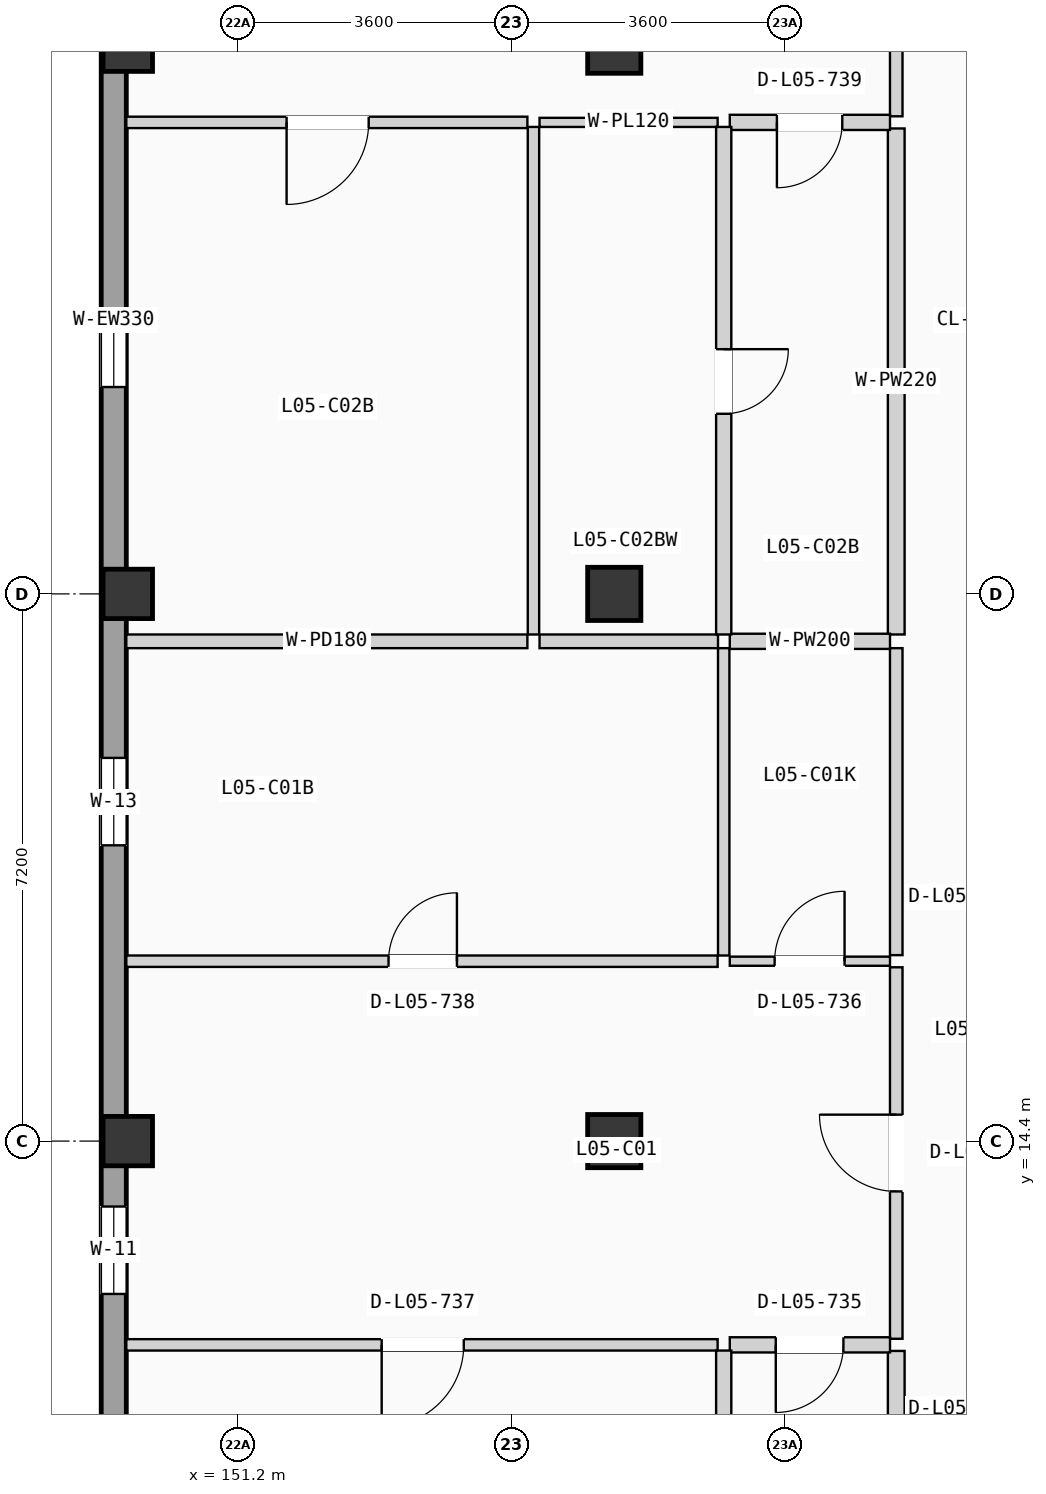
"""IFC4 building model, lengths in metres.
Left out: names, types, materials, properties, quantities, classifications, styles, units other than length and angle.
Written with IfcOpenShell. Run it as: python <this file> out.ifc"""

import sys

from ifc_helpers import new_model, si_unit, direction, frame, frame_2d, origin, origin_2d, place, context, subcontext, project, spatial, rectangle, extrude, element, fill, save


model = new_model("IFC4")
c1 = context("Model", 3, precision=1e-05, world=origin(), true_north=direction((0.0, 1.0)))
c2 = subcontext(c1, "Body", "Model", "MODEL_VIEW")
j1 = project(units=[si_unit("LENGTHUNIT", "METRE"), si_unit("PLANEANGLEUNIT", "RADIAN")], contexts=[c1])
p1 = place(None, origin())
s1 = spatial("IfcSite", under=j1, at=p1, CompositionType="ELEMENT")
p2 = place(p1, origin())
s2 = spatial("IfcBuilding", under=s1, at=p2, CompositionType="ELEMENT")
p3 = place(p2, frame((0.0, 0.0, 18.375)))
s3 = spatial("IfcBuildingStorey", under=s2, at=p3, CompositionType="ELEMENT", Elevation=18.375)
for number, where, z_axis, x_axis in (
    (1, (149.75, 14.4, 0.0), (0.0, 0.0, 1.0), (1.0, 0.0, 0.0)),
    (2, (149.75, 21.6, 0.0), (0.0, 0.0, 1.0), (1.0, 0.0, 0.0)),
    (3, (149.75, 28.8, 0.0), (0.0, 0.0, 1.0), (1.0, 0.0, 0.0)),
):
    element("IfcColumn", number, at=place(p3, frame(where, z_axis=z_axis, x_axis=x_axis)), inside=s3, PredefinedType="COLUMN", context=c2, shape_type="SweptSolid", body=[
        extrude(rectangle(XDim=0.65, YDim=0.65, at=origin_2d()), origin(), (0.0, 0.0, 1.0), 3.15),
    ])
for number, where, z_axis, x_axis in (
    (4, (156.15, 14.4, 0.0), (0.0, 0.0, 1.0), (1.0, 0.0, 0.0)),
    (5, (156.15, 21.6, 0.0), (0.0, 0.0, 1.0), (1.0, 0.0, 0.0)),
    (6, (156.15, 28.8, 0.0), (0.0, 0.0, 1.0), (1.0, 0.0, 0.0)),
):
    element("IfcColumn", number, at=place(p3, frame(where, z_axis=z_axis, x_axis=x_axis)), inside=s3, PredefinedType="COLUMN", context=c2, shape_type="SweptSolid", body=[
        extrude(rectangle(XDim=0.7, YDim=0.7, at=origin_2d()), origin(), (0.0, 0.0, 1.0), 3.15),
    ])
p4 = place(p3, frame((149.565, 0.33, 0.0), z_axis=(0.0, 0.0, 1.0), x_axis=(0.0, 1.0, 0.0)))
e7 = element("IfcWall", 7, at=p4, inside=s3, PredefinedType="SOLIDWALL", context=c2, shape_type="SweptSolid", body=[
    extrude(rectangle(XDim=49.74, YDim=0.33, at=frame_2d((24.87, 0.0))), origin(), (0.0, 0.0, 1.0), 2.89),
])
p5 = place(p4, frame((12.059, 0.0, 0.9)))
e8 = element("IfcOpeningElement", 8, at=p5, cuts=e7, PredefinedType="OPENING", context=c2, shape_type="SweptSolid", body=[
    extrude(rectangle(XDim=1.15, YDim=1.2, at=frame_2d((0.575, 0.6))), frame((0.0, 0.175, 0.0), z_axis=(0.0, -1.0, 0.0), x_axis=(1.0, 0.0, 0.0)), (0.0, 0.0, 1.0), 0.35),
])
p6 = place(p4, frame((8.714, 0.0, 0.855)))
e9 = element("IfcOpeningElement", 9, at=p6, cuts=e7, PredefinedType="OPENING", context=c2, shape_type="SweptSolid", body=[
    extrude(rectangle(XDim=1.15, YDim=1.35, at=frame_2d((0.575, 0.675))), frame((0.0, 0.175, 0.0), z_axis=(0.0, -1.0, 0.0), x_axis=(1.0, 0.0, 0.0)), (0.0, 0.0, 1.0), 0.35),
])
p7 = place(p4, frame((17.962, 0.0, 0.705)))
e10 = element("IfcOpeningElement", 10, at=p7, cuts=e7, PredefinedType="OPENING", context=c2, shape_type="SweptSolid", body=[
    extrude(rectangle(XDim=1.15, YDim=1.5, at=frame_2d((0.575, 0.75))), frame((0.0, 0.175, 0.0), z_axis=(0.0, -1.0, 0.0), x_axis=(1.0, 0.0, 0.0)), (0.0, 0.0, 1.0), 0.35),
])
p8 = place(p4, frame((31.115, 0.0, 0.555)))
e11 = element("IfcOpeningElement", 11, at=p8, cuts=e7, PredefinedType="OPENING", context=c2, shape_type="SweptSolid", body=[
    extrude(rectangle(XDim=1.15, YDim=1.65, at=frame_2d((0.575, 0.825))), frame((0.0, 0.175, 0.0), z_axis=(0.0, -1.0, 0.0), x_axis=(1.0, 0.0, 0.0)), (0.0, 0.0, 1.0), 0.35),
])
p9 = place(p4, frame((23.992, 0.0, 0.85)))
e12 = element("IfcOpeningElement", 12, at=p9, cuts=e7, PredefinedType="OPENING", context=c2, shape_type="SweptSolid", body=[
    extrude(rectangle(XDim=0.95, YDim=1.2, at=frame_2d((0.475, 0.6))), frame((0.0, 0.175, 0.0), z_axis=(0.0, -1.0, 0.0), x_axis=(1.0, 0.0, 0.0)), (0.0, 0.0, 1.0), 0.35),
])
p10 = place(p4, frame((38.58, 0.0, 0.9)))
e13 = element("IfcOpeningElement", 13, at=p10, cuts=e7, PredefinedType="OPENING", context=c2, shape_type="SweptSolid", body=[
    extrude(rectangle(XDim=1.25, YDim=1.2, at=frame_2d((0.625, 0.6))), frame((0.0, 0.175, 0.0), z_axis=(0.0, -1.0, 0.0), x_axis=(1.0, 0.0, 0.0)), (0.0, 0.0, 1.0), 0.35),
])
p11 = place(p3, frame((159.86, 11.799, 0.0), z_axis=(0.0, 0.0, 1.0), x_axis=(0.0, 1.0, 0.0)))
e14 = element("IfcWall", 14, at=p11, inside=s3, PredefinedType="PARTITIONING", context=c2, shape_type="SweptSolid", body=[
    extrude(rectangle(XDim=4.888, YDim=0.165, at=frame_2d((2.444, 0.0))), origin(), (0.0, 0.0, 1.0), 2.87),
])
p12 = place(p11, frame((1.939, 0.0, 0.0)))
e15 = element("IfcOpeningElement", 15, at=p12, cuts=e14, PredefinedType="OPENING", context=c2, shape_type="SweptSolid", body=[
    extrude(rectangle(XDim=1.01, YDim=2.11, at=frame_2d((0.505, 1.055))), frame((0.0, 0.093, 0.0), z_axis=(0.0, -1.0, 0.0), x_axis=(1.0, 0.0, 0.0)), (0.0, 0.0, 1.0), 0.185),
])
p13 = place(p3, frame((159.86, 7.6, 0.0), z_axis=(0.0, 0.0, 1.0), x_axis=(0.0, 1.0, 0.0)))
e16 = element("IfcWall", 16, at=p13, inside=s3, PredefinedType="PLUMBINGWALL", context=c2, shape_type="SweptSolid", body=[
    extrude(rectangle(XDim=4.039, YDim=0.22, at=frame_2d((2.02, 0.0))), origin(), (0.0, 0.0, 1.0), 2.87),
])
p14 = place(p3, frame((159.86, 16.847, 0.0), z_axis=(0.0, 0.0, 1.0), x_axis=(0.0, 1.0, 0.0)))
e17 = element("IfcWall", 17, at=p14, inside=s3, PredefinedType="PARTITIONING", context=c2, shape_type="SweptSolid", body=[
    extrude(rectangle(XDim=4.039, YDim=0.165, at=frame_2d((2.02, 0.0))), origin(), (0.0, 0.0, 1.0), 2.87),
])
p15 = place(p3, frame((159.86, 27.884, 0.0), z_axis=(0.0, 0.0, 1.0), x_axis=(0.0, 1.0, 0.0)))
e18 = element("IfcWall", 18, at=p15, inside=s3, PredefinedType="PARTITIONING", context=c2, shape_type="SweptSolid", body=[
    extrude(rectangle(XDim=7.086, YDim=0.165, at=frame_2d((3.543, 0.0))), origin(), (0.0, 0.0, 1.0), 2.87),
])
p16 = place(p15, frame((3.038, 0.0, 0.0)))
e19 = element("IfcOpeningElement", 19, at=p16, cuts=e18, PredefinedType="OPENING", context=c2, shape_type="SweptSolid", body=[
    extrude(rectangle(XDim=1.01, YDim=2.11, at=frame_2d((0.505, 1.055))), frame((0.0, 0.093, 0.0), z_axis=(0.0, -1.0, 0.0), x_axis=(1.0, 0.0, 0.0)), (0.0, 0.0, 1.0), 0.185),
])
p17 = place(p3, frame((159.86, 21.066, 0.0), z_axis=(0.0, 0.0, 1.0), x_axis=(0.0, 1.0, 0.0)))
e20 = element("IfcWall", 20, at=p17, inside=s3, PredefinedType="PLUMBINGWALL", context=c2, shape_type="SweptSolid", body=[
    extrude(rectangle(XDim=6.658, YDim=0.22, at=frame_2d((3.329, 0.0))), origin(), (0.0, 0.0, 1.0), 2.87),
])
p18 = place(p3, frame((157.67, 11.719, 0.0), z_axis=(0.0, 0.0, 1.0), x_axis=(1.0, 0.0, 0.0)))
e21 = element("IfcWall", 21, at=p18, inside=s3, PredefinedType="PLUMBINGWALL", context=c2, shape_type="SweptSolid", body=[
    extrude(rectangle(XDim=2.108, YDim=0.2, at=frame_2d((1.054, 0.0))), origin(), (0.0, 0.0, 1.0), 2.87),
])
p19 = place(p18, frame((0.605, 0.0, 0.0)))
e22 = element("IfcOpeningElement", 22, at=p19, cuts=e21, PredefinedType="OPENING", context=c2, shape_type="SweptSolid", body=[
    extrude(rectangle(XDim=0.89, YDim=2.03, at=frame_2d((0.445, 1.015))), frame((0.0, 0.11, 0.0), z_axis=(0.0, -1.0, 0.0), x_axis=(1.0, 0.0, 0.0)), (0.0, 0.0, 1.0), 0.22),
])
p20 = place(p3, frame((157.67, 16.767, 0.0), z_axis=(0.0, 0.0, 1.0), x_axis=(1.0, 0.0, 0.0)))
e23 = element("IfcWall", 23, at=p20, inside=s3, PredefinedType="PARTITIONING", context=c2, shape_type="SweptSolid", body=[
    extrude(rectangle(XDim=2.108, YDim=0.12, at=frame_2d((1.054, 0.0))), origin(), (0.0, 0.0, 1.0), 2.87),
])
p21 = place(p20, frame((0.59, 0.0, 0.0)))
e24 = element("IfcOpeningElement", 24, at=p21, cuts=e23, PredefinedType="OPENING", context=c2, shape_type="SweptSolid", body=[
    extrude(rectangle(XDim=0.92, YDim=2.02, at=frame_2d((0.46, 1.01))), frame((0.0, 0.07, 0.0), z_axis=(0.0, -1.0, 0.0), x_axis=(1.0, 0.0, 0.0)), (0.0, 0.0, 1.0), 0.14),
])
p22 = place(p3, frame((149.73, 11.719, 0.0), z_axis=(0.0, 0.0, 1.0), x_axis=(1.0, 0.0, 0.0)))
e25 = element("IfcWall", 25, at=p22, inside=s3, PredefinedType="PARTITIONING", context=c2, shape_type="SweptSolid", body=[
    extrude(rectangle(XDim=7.78, YDim=0.15, at=frame_2d((3.89, 0.0))), origin(), (0.0, 0.0, 1.0), 2.87),
])
p23 = place(p22, frame((3.36, 0.0, 0.0)))
e26 = element("IfcOpeningElement", 26, at=p23, cuts=e25, PredefinedType="OPENING", context=c2, shape_type="SweptSolid", body=[
    extrude(rectangle(XDim=1.08, YDim=2.1, at=frame_2d((0.54, 1.05))), frame((0.0, 0.085, 0.0), z_axis=(0.0, -1.0, 0.0), x_axis=(1.0, 0.0, 0.0)), (0.0, 0.0, 1.0), 0.17),
])
p24 = place(p3, frame((149.73, 16.767, 0.0), z_axis=(0.0, 0.0, 1.0), x_axis=(1.0, 0.0, 0.0)))
e27 = element("IfcWall", 27, at=p24, inside=s3, PredefinedType="PARTITIONING", context=c2, shape_type="SweptSolid", body=[
    extrude(rectangle(XDim=7.78, YDim=0.15, at=frame_2d((3.89, 0.0))), origin(), (0.0, 0.0, 1.0), 2.87),
])
p25 = place(p24, frame((3.45, 0.0, 0.0)))
e28 = element("IfcOpeningElement", 28, at=p25, cuts=e27, PredefinedType="OPENING", context=c2, shape_type="SweptSolid", body=[
    extrude(rectangle(XDim=0.9, YDim=2.04, at=frame_2d((0.45, 1.02))), frame((0.0, 0.085, 0.0), z_axis=(0.0, -1.0, 0.0), x_axis=(1.0, 0.0, 0.0)), (0.0, 0.0, 1.0), 0.17),
])
p26 = place(p3, frame((157.59, 7.6, 0.0), z_axis=(0.0, 0.0, 1.0), x_axis=(0.0, 1.0, 0.0)))
e29 = element("IfcWall", 29, at=p26, inside=s3, PredefinedType="PLUMBINGWALL", context=c2, shape_type="SweptSolid", body=[
    extrude(rectangle(XDim=4.044, YDim=0.2, at=frame_2d((2.022, 0.0))), origin(), (0.0, 0.0, 1.0), 2.87),
])
p27 = place(p3, frame((157.59, 16.842, 0.0), z_axis=(0.0, 0.0, 1.0), x_axis=(0.0, 1.0, 0.0)))
e30 = element("IfcWall", 30, at=p27, inside=s3, PredefinedType="PARTITIONING", context=c2, shape_type="SweptSolid", body=[
    extrude(rectangle(XDim=4.044, YDim=0.15, at=frame_2d((2.022, 0.0))), origin(), (0.0, 0.0, 1.0), 2.87),
])
p28 = place(p3, frame((157.67, 20.976, 0.0), z_axis=(0.0, 0.0, 1.0), x_axis=(1.0, 0.0, 0.0)))
e31 = element("IfcWall", 31, at=p28, inside=s3, PredefinedType="PLUMBINGWALL", context=c2, shape_type="SweptSolid", body=[
    extrude(rectangle(XDim=2.108, YDim=0.2, at=frame_2d((1.054, 0.0))), origin(), (0.0, 0.0, 1.0), 2.87),
])
p29 = place(p3, frame((149.73, 20.976, 0.0), z_axis=(0.0, 0.0, 1.0), x_axis=(1.0, 0.0, 0.0)))
e32 = element("IfcWall", 32, at=p29, inside=s3, PredefinedType="PARTITIONING", context=c2, shape_type="SweptSolid", body=[
    extrude(rectangle(XDim=5.277, YDim=0.18, at=frame_2d((2.639, 0.0))), origin(), (0.0, 0.0, 1.0), 2.87),
])
p30 = place(p3, frame((155.167, 20.976, 0.0), z_axis=(0.0, 0.0, 1.0), x_axis=(1.0, 0.0, 0.0)))
e33 = element("IfcWall", 33, at=p30, inside=s3, PredefinedType="PARTITIONING", context=c2, shape_type="SweptSolid", body=[
    extrude(rectangle(XDim=2.348, YDim=0.18, at=frame_2d((1.174, 0.0))), origin(), (0.0, 0.0, 1.0), 2.87),
])
p31 = place(p3, frame((157.67, 27.804, 0.0), z_axis=(0.0, 0.0, 1.0), x_axis=(1.0, 0.0, 0.0)))
e34 = element("IfcWall", 34, at=p31, inside=s3, PredefinedType="PLUMBINGWALL", context=c2, shape_type="SweptSolid", body=[
    extrude(rectangle(XDim=2.108, YDim=0.2, at=frame_2d((1.054, 0.0))), origin(), (0.0, 0.0, 1.0), 2.87),
])
p32 = place(p31, frame((0.62, 0.0, 0.0)))
e35 = element("IfcOpeningElement", 35, at=p32, cuts=e34, PredefinedType="OPENING", context=c2, shape_type="SweptSolid", body=[
    extrude(rectangle(XDim=0.86, YDim=2.0, at=frame_2d((0.43, 1.0))), frame((0.0, 0.11, 0.0), z_axis=(0.0, -1.0, 0.0), x_axis=(1.0, 0.0, 0.0)), (0.0, 0.0, 1.0), 0.22),
])
p33 = place(p3, frame((149.73, 27.804, 0.0), z_axis=(0.0, 0.0, 1.0), x_axis=(1.0, 0.0, 0.0)))
e36 = element("IfcWall", 36, at=p33, inside=s3, PredefinedType="PARTITIONING", context=c2, shape_type="SweptSolid", body=[
    extrude(rectangle(XDim=5.277, YDim=0.15, at=frame_2d((2.639, 0.0))), origin(), (0.0, 0.0, 1.0), 2.87),
])
p34 = place(p33, frame((2.109, 0.0, 0.0)))
e37 = element("IfcOpeningElement", 37, at=p34, cuts=e36, PredefinedType="OPENING", context=c2, shape_type="SweptSolid", body=[
    extrude(rectangle(XDim=1.08, YDim=2.1, at=frame_2d((0.54, 1.05))), frame((0.0, 0.085, 0.0), z_axis=(0.0, -1.0, 0.0), x_axis=(1.0, 0.0, 0.0)), (0.0, 0.0, 1.0), 0.17),
])
p35 = place(p3, frame((155.167, 27.804, 0.0), z_axis=(0.0, 0.0, 1.0), x_axis=(1.0, 0.0, 0.0)))
e38 = element("IfcWall", 38, at=p35, inside=s3, PredefinedType="PARTITIONING", context=c2, shape_type="SweptSolid", body=[
    extrude(rectangle(XDim=2.343, YDim=0.12, at=frame_2d((1.171, 0.0))), origin(), (0.0, 0.0, 1.0), 2.87),
])
p36 = place(p3, frame((157.59, 21.066, 0.0), z_axis=(0.0, 0.0, 1.0), x_axis=(0.0, 1.0, 0.0)))
e39 = element("IfcWall", 39, at=p36, inside=s3, PredefinedType="PLUMBINGWALL", context=c2, shape_type="SweptSolid", body=[
    extrude(rectangle(XDim=6.678, YDim=0.2, at=frame_2d((3.339, 0.0))), origin(), (0.0, 0.0, 1.0), 2.87),
])
p37 = place(p36, frame((2.904, 0.0, 0.0)))
e40 = element("IfcOpeningElement", 40, at=p37, cuts=e39, PredefinedType="OPENING", context=c2, shape_type="SweptSolid", body=[
    extrude(rectangle(XDim=0.85, YDim=2.01, at=frame_2d((0.425, 1.005))), frame((0.0, 0.11, 0.0), z_axis=(0.0, -1.0, 0.0), x_axis=(1.0, 0.0, 0.0)), (0.0, 0.0, 1.0), 0.22),
])
p38 = place(p3, frame((155.087, 21.066, 0.0), z_axis=(0.0, 0.0, 1.0), x_axis=(0.0, 1.0, 0.0)))
e41 = element("IfcWall", 41, at=p38, inside=s3, PredefinedType="PARTITIONING", context=c2, shape_type="SweptSolid", body=[
    extrude(rectangle(XDim=6.678, YDim=0.15, at=frame_2d((3.339, 0.0))), origin(), (0.0, 0.0, 1.0), 2.87),
])
p39 = place(p5, origin())
e42 = element("IfcWindow", 42, at=p39, inside=s3, PartitioningType="SINGLE_PANEL", PredefinedType="WINDOW", context=c2, shape_type="SweptSolid", body=[
    extrude(rectangle(XDim=1.15, YDim=1.2, at=frame_2d((0.575, 0.6))), frame((0.0, 0.03, 0.0), z_axis=(0.0, -1.0, 0.0), x_axis=(1.0, 0.0, 0.0)), (0.0, 0.0, 1.0), 0.06),
])
fill(e8, e42)
p40 = place(p7, origin())
e43 = element("IfcWindow", 43, at=p40, inside=s3, PartitioningType="SINGLE_PANEL", PredefinedType="WINDOW", context=c2, shape_type="SweptSolid", body=[
    extrude(rectangle(XDim=1.15, YDim=1.5, at=frame_2d((0.575, 0.75))), frame((0.0, 0.03, 0.0), z_axis=(0.0, -1.0, 0.0), x_axis=(1.0, 0.0, 0.0)), (0.0, 0.0, 1.0), 0.06),
])
fill(e10, e43)
p41 = place(p9, origin())
e44 = element("IfcWindow", 44, at=p41, inside=s3, PartitioningType="SINGLE_PANEL", PredefinedType="WINDOW", context=c2, shape_type="SweptSolid", body=[
    extrude(rectangle(XDim=0.95, YDim=1.2, at=frame_2d((0.475, 0.6))), frame((0.0, 0.03, 0.0), z_axis=(0.0, -1.0, 0.0), x_axis=(1.0, 0.0, 0.0)), (0.0, 0.0, 1.0), 0.06),
])
fill(e12, e44)
p42 = place(p12, origin())
e45 = element("IfcDoor", 45, at=p42, inside=s3, OperationType="SINGLE_SWING_RIGHT", PredefinedType="DOOR", context=c2, shape_type="SweptSolid", body=[
    extrude(rectangle(XDim=1.01, YDim=2.11, at=frame_2d((0.505, 1.055))), frame((0.0, 0.025, 0.0), z_axis=(0.0, -1.0, 0.0), x_axis=(1.0, 0.0, 0.0)), (0.0, 0.0, 1.0), 0.05),
])
fill(e15, e45)
p43 = place(p19, frame((0.89, 0.0, 0.0), z_axis=(0.0, 0.0, 1.0), x_axis=(-1.0, 0.0, 0.0)))
e46 = element("IfcDoor", 46, at=p43, inside=s3, OperationType="SINGLE_SWING_LEFT", PredefinedType="DOOR", context=c2, shape_type="SweptSolid", body=[
    extrude(rectangle(XDim=0.89, YDim=2.03, at=frame_2d((0.445, 1.015))), frame((0.0, 0.025, 0.0), z_axis=(0.0, -1.0, 0.0), x_axis=(1.0, 0.0, 0.0)), (0.0, 0.0, 1.0), 0.05),
])
fill(e22, e46)
p44 = place(p21, origin())
e47 = element("IfcDoor", 47, at=p44, inside=s3, OperationType="SINGLE_SWING_RIGHT", PredefinedType="DOOR", context=c2, shape_type="SweptSolid", body=[
    extrude(rectangle(XDim=0.92, YDim=2.02, at=frame_2d((0.46, 1.01))), frame((0.0, 0.025, 0.0), z_axis=(0.0, -1.0, 0.0), x_axis=(1.0, 0.0, 0.0)), (0.0, 0.0, 1.0), 0.05),
])
fill(e24, e47)
p45 = place(p23, frame((1.08, 0.0, 0.0), z_axis=(0.0, 0.0, 1.0), x_axis=(-1.0, 0.0, 0.0)))
e48 = element("IfcDoor", 48, at=p45, inside=s3, OperationType="SINGLE_SWING_LEFT", PredefinedType="DOOR", context=c2, shape_type="SweptSolid", body=[
    extrude(rectangle(XDim=1.08, YDim=2.1, at=frame_2d((0.54, 1.05))), frame((0.0, 0.025, 0.0), z_axis=(0.0, -1.0, 0.0), x_axis=(1.0, 0.0, 0.0)), (0.0, 0.0, 1.0), 0.05),
])
fill(e26, e48)
p46 = place(p25, origin())
e49 = element("IfcDoor", 49, at=p46, inside=s3, OperationType="SINGLE_SWING_RIGHT", PredefinedType="DOOR", context=c2, shape_type="SweptSolid", body=[
    extrude(rectangle(XDim=0.9, YDim=2.04, at=frame_2d((0.45, 1.02))), frame((0.0, 0.025, 0.0), z_axis=(0.0, -1.0, 0.0), x_axis=(1.0, 0.0, 0.0)), (0.0, 0.0, 1.0), 0.05),
])
fill(e28, e49)
p47 = place(p32, frame((0.86, 0.0, 0.0), z_axis=(0.0, 0.0, 1.0), x_axis=(-1.0, 0.0, 0.0)))
e50 = element("IfcDoor", 50, at=p47, inside=s3, OperationType="SINGLE_SWING_LEFT", PredefinedType="DOOR", context=c2, shape_type="SweptSolid", body=[
    extrude(rectangle(XDim=0.86, YDim=2.0, at=frame_2d((0.43, 1.0))), frame((0.0, 0.025, 0.0), z_axis=(0.0, -1.0, 0.0), x_axis=(1.0, 0.0, 0.0)), (0.0, 0.0, 1.0), 0.05),
])
fill(e35, e50)
p48 = place(p34, frame((1.08, 0.0, 0.0), z_axis=(0.0, 0.0, 1.0), x_axis=(-1.0, 0.0, 0.0)))
e51 = element("IfcDoor", 51, at=p48, inside=s3, OperationType="SINGLE_SWING_LEFT", PredefinedType="DOOR", context=c2, shape_type="SweptSolid", body=[
    extrude(rectangle(XDim=1.08, YDim=2.1, at=frame_2d((0.54, 1.05))), frame((0.0, 0.025, 0.0), z_axis=(0.0, -1.0, 0.0), x_axis=(1.0, 0.0, 0.0)), (0.0, 0.0, 1.0), 0.05),
])
fill(e37, e51)
p49 = place(p37, frame((0.85, 0.0, 0.0), z_axis=(0.0, 0.0, 1.0), x_axis=(-1.0, 0.0, 0.0)))
e52 = element("IfcDoor", 52, at=p49, inside=s3, OperationType="SINGLE_SWING_RIGHT", PredefinedType="DOOR", context=c2, shape_type="SweptSolid", body=[
    extrude(rectangle(XDim=0.85, YDim=2.01, at=frame_2d((0.425, 1.005))), frame((0.0, 0.025, 0.0), z_axis=(0.0, -1.0, 0.0), x_axis=(1.0, 0.0, 0.0)), (0.0, 0.0, 1.0), 0.05),
])
fill(e40, e52)
save(model, sys.argv[1])
